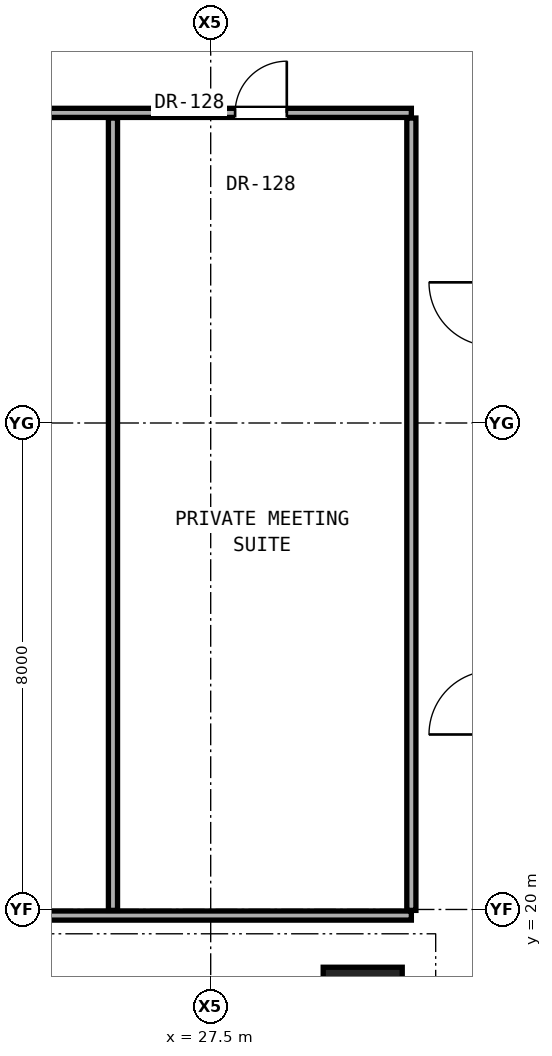
"""IFC4 building model, lengths in metres.
Left out: names, types, materials, properties, quantities, classifications, styles, units other than length and angle.
Written with IfcOpenShell. Run it as: python <this file> out.ifc"""

import sys

from ifc_helpers import new_model, si_unit, direction, frame, frame_2d, origin, origin_2d, place, context, subcontext, project, spatial, rectangle, extrude, element, fill, save


model = new_model("IFC4")
c1 = context("Model", 3, precision=1e-05, world=origin(), true_north=direction((0.0, 1.0)))
c2 = subcontext(c1, "Body", "Model", "MODEL_VIEW")
j1 = project(units=[si_unit("LENGTHUNIT", "METRE"), si_unit("PLANEANGLEUNIT", "RADIAN")], contexts=[c1])
p1 = place(None, origin())
s1 = spatial("IfcSite", under=j1, at=p1, CompositionType="ELEMENT")
p2 = place(p1, origin())
s2 = spatial("IfcBuilding", under=s1, at=p2, CompositionType="ELEMENT")
p3 = place(p2, frame((0.0, 0.0, 52.1)))
s3 = spatial("IfcBuildingStorey", under=s2, at=p3, CompositionType="ELEMENT", Elevation=52.1)
p4 = place(p3, frame((30.0, 18.4, 0.0), z_axis=(0.0, 0.0, 1.0), x_axis=(1.0, 0.0, 0.0)))
e1 = element("IfcColumn", 1, at=p4, inside=s3, PredefinedType="COLUMN", context=c2, shape_type="SweptSolid", body=[
    extrude(rectangle(XDim=1.3, YDim=1.3, at=origin_2d()), origin(), (0.0, 0.0, 1.0), 3.3),
])
p5 = place(p3, frame((10.2, 19.9, 0.0), z_axis=(0.0, 0.0, 1.0), x_axis=(1.0, 0.0, 0.0)))
e2 = element("IfcWall", 2, at=p5, inside=s3, PredefinedType="PARTITIONING", context=c2, shape_type="SweptSolid", body=[
    extrude(rectangle(XDim=20.6, YDim=0.15, at=frame_2d((10.3, 0.0))), origin(), (0.0, 0.0, 1.0), 2.104),
])
p6 = place(p5, frame((1.695, 0.0, 0.0)))
e3 = element("IfcOpeningElement", 3, at=p6, cuts=e2, PredefinedType="OPENING", context=c2, shape_type="SweptSolid", body=[
    extrude(rectangle(XDim=0.85, YDim=2.01, at=frame_2d((0.425, 1.005))), frame((0.0, 0.085, 0.0), z_axis=(0.0, -1.0, 0.0), x_axis=(1.0, 0.0, 0.0)), (0.0, 0.0, 1.0), 0.17),
])
p7 = place(p5, frame((3.94, 0.0, 0.0)))
e4 = element("IfcOpeningElement", 4, at=p7, cuts=e2, PredefinedType="OPENING", context=c2, shape_type="SweptSolid", body=[
    extrude(rectangle(XDim=0.85, YDim=2.01, at=frame_2d((0.425, 1.005))), frame((0.0, 0.085, 0.0), z_axis=(0.0, -1.0, 0.0), x_axis=(1.0, 0.0, 0.0)), (0.0, 0.0, 1.0), 0.17),
])
p8 = place(p5, frame((7.684, 0.0, 0.0)))
e5 = element("IfcOpeningElement", 5, at=p8, cuts=e2, PredefinedType="OPENING", context=c2, shape_type="SweptSolid", body=[
    extrude(rectangle(XDim=0.85, YDim=2.01, at=frame_2d((0.425, 1.005))), frame((0.0, 0.085, 0.0), z_axis=(0.0, -1.0, 0.0), x_axis=(1.0, 0.0, 0.0)), (0.0, 0.0, 1.0), 0.17),
])
p9 = place(p3, frame((10.2, 33.1, 0.0), z_axis=(0.0, 0.0, 1.0), x_axis=(1.0, 0.0, 0.0)))
e6 = element("IfcWall", 6, at=p9, inside=s3, PredefinedType="PARTITIONING", context=c2, shape_type="SweptSolid", body=[
    extrude(rectangle(XDim=20.6, YDim=0.15, at=frame_2d((10.3, 0.0))), origin(), (0.0, 0.0, 1.0), 2.104),
])
p10 = place(p9, frame((12.666, 0.0, 0.0)))
e7 = element("IfcOpeningElement", 7, at=p10, cuts=e6, PredefinedType="OPENING", context=c2, shape_type="SweptSolid", body=[
    extrude(rectangle(XDim=0.85, YDim=2.01, at=frame_2d((0.425, 1.005))), frame((0.0, 0.085, 0.0), z_axis=(0.0, -1.0, 0.0), x_axis=(1.0, 0.0, 0.0)), (0.0, 0.0, 1.0), 0.17),
])
p11 = place(p9, frame((17.701, 0.0, 0.0)))
e8 = element("IfcOpeningElement", 8, at=p11, cuts=e6, PredefinedType="OPENING", context=c2, shape_type="SweptSolid", body=[
    extrude(rectangle(XDim=0.85, YDim=2.01, at=frame_2d((0.425, 1.005))), frame((0.0, 0.085, 0.0), z_axis=(0.0, -1.0, 0.0), x_axis=(1.0, 0.0, 0.0)), (0.0, 0.0, 1.0), 0.17),
])
p12 = place(p3, frame((25.893, 19.985, 0.0), z_axis=(0.0, 0.0, 1.0), x_axis=(0.0, 1.0, 0.0)))
e9 = element("IfcWall", 9, at=p12, inside=s3, PredefinedType="PARTITIONING", context=c2, shape_type="SweptSolid", body=[
    extrude(rectangle(XDim=13.03, YDim=0.15, at=frame_2d((6.515, 0.0))), origin(), (0.0, 0.0, 1.0), 2.104),
])
p13 = place(p3, frame((30.8, 19.985, 0.0), z_axis=(0.0, 0.0, 1.0), x_axis=(0.0, 1.0, 0.0)))
e10 = element("IfcWall", 10, at=p13, inside=s3, PredefinedType="PARTITIONING", context=c2, shape_type="SweptSolid", body=[
    extrude(rectangle(XDim=13.03, YDim=0.15, at=frame_2d((6.515, 0.0))), origin(), (0.0, 0.0, 1.0), 2.279),
])
p14 = place(p11, origin())
e11 = element("IfcDoor", 11, at=p14, inside=s3, OperationType="SINGLE_SWING_RIGHT", PredefinedType="DOOR", context=c2, shape_type="SweptSolid", body=[
    extrude(rectangle(XDim=0.85, YDim=2.01, at=frame_2d((0.425, 1.005))), frame((0.0, 0.025, 0.0), z_axis=(0.0, -1.0, 0.0), x_axis=(1.0, 0.0, 0.0)), (0.0, 0.0, 1.0), 0.05),
])
fill(e8, e11)
save(model, sys.argv[1])
